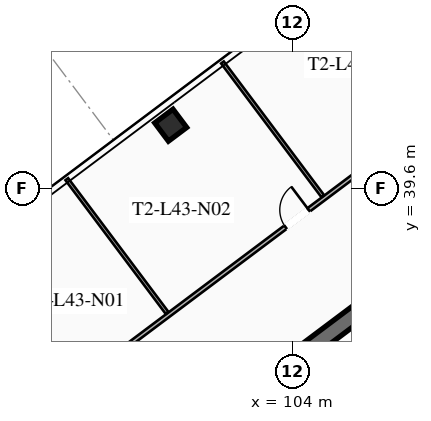
"""IFC4 building model, lengths in metres.
Left out: names, types, materials, properties, quantities, classifications, styles, units other than length and angle.
Written with IfcOpenShell. Run it as: python <this file> out.ifc"""

import sys

from ifc_helpers import new_model, si_unit, direction, frame, frame_2d, origin, origin_2d, place, context, subcontext, project, spatial, rectangle, hollow_rectangle, extrude, element, fill, save


model = new_model("IFC4")
c1 = context("Model", 3, precision=1e-05, world=origin(), true_north=direction((0.0, 1.0)))
c2 = subcontext(c1, "Body", "Model", "MODEL_VIEW")
j1 = project(units=[si_unit("LENGTHUNIT", "METRE"), si_unit("PLANEANGLEUNIT", "RADIAN")], contexts=[c1])
p1 = place(None, origin())
s1 = spatial("IfcSite", under=j1, at=p1, CompositionType="ELEMENT")
p2 = place(p1, origin())
s2 = spatial("IfcBuilding", under=s1, at=p2, CompositionType="ELEMENT")
p3 = place(p2, frame((0.0, 0.0, 160.55)))
s3 = spatial("IfcBuildingStorey", under=s2, at=p3, CompositionType="ELEMENT", Elevation=160.55)
p4 = place(p3, frame((103.461, 33.502, 0.0), z_axis=(0.0, 0.0, 1.0), x_axis=(0.799998054672, 0.600002593761, 0.0)))
e1 = element("IfcWall", 1, at=p4, inside=s3, PredefinedType="SHEAR", context=c2, shape_type="SweptSolid", body=[
    extrude(rectangle(XDim=15.06, YDim=0.55, at=frame_2d((7.53, 0.0))), origin(), (0.0, 0.0, 1.0), 3.55),
])
p5 = place(p4, frame((4.58, 0.0, 0.0)))
e2 = element("IfcOpeningElement", 2, at=p5, cuts=e1, PredefinedType="OPENING", context=c2, shape_type="SweptSolid", body=[
    extrude(rectangle(XDim=1.25, YDim=2.25, at=frame_2d((0.625, 1.125))), frame((0.0, 0.285, 0.0), z_axis=(0.0, -1.0, 0.0), x_axis=(1.0, 0.0, 0.0)), (0.0, 0.0, 1.0), 0.57),
])
p6 = place(p4, frame((9.63, 0.0, 0.0)))
e3 = element("IfcOpeningElement", 3, at=p6, cuts=e1, PredefinedType="OPENING", context=c2, shape_type="SweptSolid", body=[
    extrude(rectangle(XDim=1.25, YDim=2.25, at=frame_2d((0.625, 1.125))), frame((0.0, 0.285, 0.0), z_axis=(0.0, -1.0, 0.0), x_axis=(1.0, 0.0, 0.0)), (0.0, 0.0, 1.0), 0.57),
])
p7 = place(p3, frame((99.99, 41.68, 0.0), z_axis=(0.0, 0.0, 1.0), x_axis=(0.799999996291, 0.600000004945, 0.0)))
e4 = element("IfcColumn", 4, at=p7, inside=s3, PredefinedType="COLUMN", context=c2, shape_type="SweptSolid", body=[
    extrude(hollow_rectangle(XDim=0.75, YDim=0.75, WallThickness=0.032, at=origin_2d()), origin(), (0.0, 0.0, 1.0), 3.37),
])
p8 = place(p3, frame((103.956, 32.842, 0.0), z_axis=(0.0, 0.0, 1.0), x_axis=(0.800015298837, 0.599979601008, 0.0)))
e5 = element("IfcWall", 5, at=p8, inside=s3, PredefinedType="SHEAR", context=c2, shape_type="SweptSolid", body=[
    extrude(rectangle(XDim=3.83, YDim=0.2, at=frame_2d((1.915, 0.0))), origin(), (0.0, 0.0, 1.0), 3.37),
])
p9 = place(p3, frame((95.8, 32.35, 0.0), z_axis=(0.0, 0.0, 1.0), x_axis=(0.8, 0.6, 0.0)))
e6 = element("IfcWall", 6, at=p9, inside=s3, PredefinedType="PARTITIONING", context=c2, shape_type="SweptSolid", body=[
    extrude(rectangle(XDim=28.7, YDim=0.135, at=frame_2d((14.35, 0.0))), origin(), (0.0, 0.0, 1.0), 2.723),
])
p10 = place(p9, frame((0.3, 0.0, 0.0)))
e7 = element("IfcOpeningElement", 7, at=p10, cuts=e6, PredefinedType="OPENING", context=c2, shape_type="SweptSolid", body=[
    extrude(rectangle(XDim=0.95, YDim=2.05, at=frame_2d((0.475, 1.025))), frame((0.0, 0.077, 0.0), z_axis=(0.0, -1.0, 0.0), x_axis=(1.0, 0.0, 0.0)), (0.0, 0.0, 1.0), 0.155),
])
p11 = place(p9, frame((9.959, 0.0, 0.0)))
e8 = element("IfcOpeningElement", 8, at=p11, cuts=e6, PredefinedType="OPENING", context=c2, shape_type="SweptSolid", body=[
    extrude(rectangle(XDim=0.95, YDim=2.05, at=frame_2d((0.475, 1.025))), frame((0.0, 0.077, 0.0), z_axis=(0.0, -1.0, 0.0), x_axis=(1.0, 0.0, 0.0)), (0.0, 0.0, 1.0), 0.155),
])
p12 = place(p9, frame((14.005, 0.0, 0.0)))
e9 = element("IfcOpeningElement", 9, at=p12, cuts=e6, PredefinedType="OPENING", context=c2, shape_type="SweptSolid", body=[
    extrude(rectangle(XDim=0.95, YDim=2.05, at=frame_2d((0.475, 1.025))), frame((0.0, 0.077, 0.0), z_axis=(0.0, -1.0, 0.0), x_axis=(1.0, 0.0, 0.0)), (0.0, 0.0, 1.0), 0.155),
])
p13 = place(p9, frame((18.049, 0.0, 0.0)))
e10 = element("IfcOpeningElement", 10, at=p13, cuts=e6, PredefinedType="OPENING", context=c2, shape_type="SweptSolid", body=[
    extrude(rectangle(XDim=0.95, YDim=2.05, at=frame_2d((0.475, 1.025))), frame((0.0, 0.077, 0.0), z_axis=(0.0, -1.0, 0.0), x_axis=(1.0, 0.0, 0.0)), (0.0, 0.0, 1.0), 0.155),
])
p14 = place(p9, frame((27.45, 0.0, 0.0)))
e11 = element("IfcOpeningElement", 11, at=p14, cuts=e6, PredefinedType="OPENING", context=c2, shape_type="SweptSolid", body=[
    extrude(rectangle(XDim=0.95, YDim=2.05, at=frame_2d((0.475, 1.025))), frame((0.0, 0.077, 0.0), z_axis=(0.0, -1.0, 0.0), x_axis=(1.0, 0.0, 0.0)), (0.0, 0.0, 1.0), 0.155),
])
p15 = place(p3, frame((99.872, 35.504, 0.0), z_axis=(0.0, 0.0, 1.0), x_axis=(-0.599992897893, 0.800005326531, 0.0)))
e12 = element("IfcWall", 12, at=p15, inside=s3, PredefinedType="PARTITIONING", context=c2, shape_type="SweptSolid", body=[
    extrude(rectangle(XDim=5.5, YDim=0.11, at=frame_2d((2.75, 0.0))), origin(), (0.0, 0.0, 1.0), 2.723),
])
p16 = place(p3, frame((104.992, 39.344, 0.0), z_axis=(0.0, 0.0, 1.0), x_axis=(-0.600014204577, 0.79998934637, 0.0)))
e13 = element("IfcWall", 13, at=p16, inside=s3, PredefinedType="PARTITIONING", context=c2, shape_type="SweptSolid", body=[
    extrude(rectangle(XDim=5.5, YDim=0.11, at=frame_2d((2.75, 0.0))), origin(), (0.0, 0.0, 1.0), 2.723),
])
p17 = place(p11, origin())
e14 = element("IfcDoor", 14, at=p17, inside=s3, OperationType="SINGLE_SWING_RIGHT", PredefinedType="DOOR", context=c2, shape_type="SweptSolid", body=[
    extrude(rectangle(XDim=0.95, YDim=2.05, at=frame_2d((0.475, 1.025))), frame((0.0, 0.025, 0.0), z_axis=(0.0, -1.0, 0.0), x_axis=(1.0, 0.0, 0.0)), (0.0, 0.0, 1.0), 0.05),
])
fill(e8, e14)
save(model, sys.argv[1])
